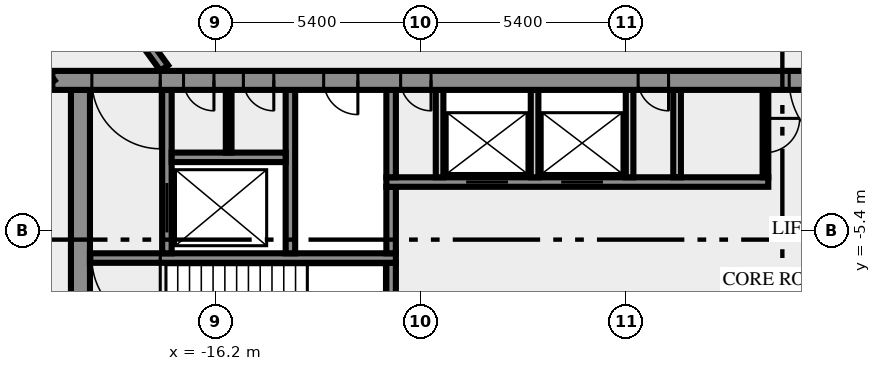
"""IFC4 building model, lengths in metres.
Left out: names, types, materials, properties, quantities, classifications, styles, units other than length and angle.
Written with IfcOpenShell. Run it as: python <this file> out.ifc"""

import sys

from ifc_helpers import new_model, si_unit, direction, frame, frame_2d, origin, place, context, subcontext, project, spatial, rectangle, extrude, element, fill, save


model = new_model("IFC4")
c1 = context("Model", 3, precision=1e-05, world=origin(), true_north=direction((0.0, 1.0)))
c2 = subcontext(c1, "Body", "Model", "MODEL_VIEW")
j1 = project(units=[si_unit("LENGTHUNIT", "METRE"), si_unit("PLANEANGLEUNIT", "RADIAN")], contexts=[c1])
p1 = place(None, origin())
s1 = spatial("IfcSite", under=j1, at=p1, CompositionType="ELEMENT")
p2 = place(p1, origin())
s2 = spatial("IfcBuilding", under=s1, at=p2, CompositionType="ELEMENT")
p3 = place(p2, frame((0.0, 0.0, 331.0)))
s3 = spatial("IfcBuildingStorey", under=s2, at=p3, CompositionType="ELEMENT", Elevation=331.0)
p4 = place(p3, frame((-19.75, -10.5, 0.0), z_axis=(0.0, 0.0, 1.0), x_axis=(0.0, 1.0, 0.0)))
e1 = element("IfcWall", 1, at=p4, inside=s3, PredefinedType="SHEAR", context=c2, shape_type="SweptSolid", body=[
    extrude(rectangle(XDim=8.8, YDim=0.5, at=frame_2d((4.4, 0.0))), origin(), (0.0, 0.0, 1.0), 3.65),
])
p5 = place(p3, frame((-11.575, -7.25, 0.0), z_axis=(0.0, 0.0, 1.0), x_axis=(0.0, 1.0, 0.0)))
e2 = element("IfcWall", 2, at=p5, inside=s3, PredefinedType="SHEAR", context=c2, shape_type="SweptSolid", body=[
    extrude(rectangle(XDim=1.0, YDim=0.25, at=frame_2d((0.5, 0.0))), origin(), (0.0, 0.0, 1.0), 3.65),
])
p6 = place(p3, frame((-11.45, -6.125, 0.0), z_axis=(0.0, 0.0, 1.0), x_axis=(-1.0, 0.0, 0.0)))
e3 = element("IfcWall", 3, at=p6, inside=s3, PredefinedType="SHEAR", context=c2, shape_type="SweptSolid", body=[
    extrude(rectangle(XDim=8.05, YDim=0.25, at=frame_2d((4.025, 0.0))), origin(), (0.0, 0.0, 1.0), 3.65),
])
p7 = place(p6, frame((6.2, 0.0, 0.0)))
e4 = element("IfcOpeningElement", 4, at=p7, cuts=e3, PredefinedType="OPENING", context=c2, shape_type="SweptSolid", body=[
    extrude(rectangle(XDim=1.8, YDim=2.1, at=frame_2d((0.9, 1.05))), frame((0.0, 0.135, 0.0), z_axis=(0.0, -1.0, 0.0), x_axis=(1.0, 0.0, 0.0)), (0.0, 0.0, 1.0), 0.27),
])
p8 = place(p3, frame((-17.475, -6.0, 0.0), z_axis=(0.0, 0.0, 1.0), x_axis=(0.0, 1.0, 0.0)))
e5 = element("IfcWall", 5, at=p8, inside=s3, PredefinedType="SHEAR", context=c2, shape_type="SweptSolid", body=[
    extrude(rectangle(XDim=4.3, YDim=0.25, at=frame_2d((2.15, 0.0))), origin(), (0.0, 0.0, 1.0), 3.65),
])
p9 = place(p8, frame((0.55, 0.0, 0.0)))
e6 = element("IfcOpeningElement", 6, at=p9, cuts=e5, PredefinedType="OPENING", context=c2, shape_type="SweptSolid", body=[
    extrude(rectangle(XDim=1.3, YDim=2.1, at=frame_2d((0.65, 1.05))), frame((0.0, 0.135, 0.0), z_axis=(0.0, -1.0, 0.0), x_axis=(1.0, 0.0, 0.0)), (0.0, 0.0, 1.0), 0.27),
])
p10 = place(p3, frame((-14.225, -6.0, 0.0), z_axis=(0.0, 0.0, 1.0), x_axis=(0.0, 1.0, 0.0)))
e7 = element("IfcWall", 7, at=p10, inside=s3, PredefinedType="SHEAR", context=c2, shape_type="SweptSolid", body=[
    extrude(rectangle(XDim=4.3, YDim=0.25, at=frame_2d((2.15, 0.0))), origin(), (0.0, 0.0, 1.0), 3.65),
])
p11 = place(p3, frame((-11.575, -6.0, 0.0), z_axis=(0.0, 0.0, 1.0), x_axis=(0.0, 1.0, 0.0)))
e8 = element("IfcWall", 8, at=p11, inside=s3, PredefinedType="SHEAR", context=c2, shape_type="SweptSolid", body=[
    extrude(rectangle(XDim=1.75, YDim=0.25, at=frame_2d((0.875, 0.0))), origin(), (0.0, 0.0, 1.0), 3.65),
])
p12 = place(p3, frame((-11.7, -4.125, 0.0), z_axis=(0.0, 0.0, 1.0), x_axis=(1.0, 0.0, 0.0)))
e9 = element("IfcWall", 9, at=p12, inside=s3, PredefinedType="SHEAR", context=c2, shape_type="SweptSolid", body=[
    extrude(rectangle(XDim=10.05, YDim=0.25, at=frame_2d((5.025, 0.0))), origin(), (0.0, 0.0, 1.0), 3.65),
])
p13 = place(p12, frame((2.1, 0.0, 0.0)))
e10 = element("IfcOpeningElement", 10, at=p13, cuts=e9, PredefinedType="OPENING", context=c2, shape_type="SweptSolid", body=[
    extrude(rectangle(XDim=1.1, YDim=2.1, at=frame_2d((0.55, 1.05))), frame((0.0, 0.135, 0.0), z_axis=(0.0, -1.0, 0.0), x_axis=(1.0, 0.0, 0.0)), (0.0, 0.0, 1.0), 0.27),
])
p14 = place(p12, frame((4.6, 0.0, 0.0)))
e11 = element("IfcOpeningElement", 11, at=p14, cuts=e9, PredefinedType="OPENING", context=c2, shape_type="SweptSolid", body=[
    extrude(rectangle(XDim=1.1, YDim=2.1, at=frame_2d((0.55, 1.05))), frame((0.0, 0.135, 0.0), z_axis=(0.0, -1.0, 0.0), x_axis=(1.0, 0.0, 0.0)), (0.0, 0.0, 1.0), 0.27),
])
p15 = place(p3, frame((-11.575, -4.0, 0.0), z_axis=(0.0, 0.0, 1.0), x_axis=(0.0, 1.0, 0.0)))
e12 = element("IfcWall", 12, at=p15, inside=s3, PredefinedType="SHEAR", context=c2, shape_type="SweptSolid", body=[
    extrude(rectangle(XDim=2.3, YDim=0.25, at=frame_2d((1.15, 0.0))), origin(), (0.0, 0.0, 1.0), 3.65),
])
for number, where, z_axis, x_axis in (
    (13, (-10.3, -4.0, 0.0), (0.0, 0.0, 1.0), (0.0, 1.0, 0.0)),
    (14, (-7.8, -4.0, 0.0), (0.0, 0.0, 1.0), (0.0, 1.0, 0.0)),
    (15, (-5.3, -4.0, 0.0), (0.0, 0.0, 1.0), (0.0, 1.0, 0.0)),
    (16, (-4.05, -4.0, 0.0), (0.0, 0.0, 1.0), (0.0, 1.0, 0.0)),
):
    element("IfcWall", number, at=place(p3, frame(where, z_axis=z_axis, x_axis=x_axis)), inside=s3, PredefinedType="SOLIDWALL", context=c2, shape_type="SweptSolid", body=[
        extrude(rectangle(XDim=2.3, YDim=0.2, at=frame_2d((1.15, 0.0))), origin(), (0.0, 0.0, 1.0), 3.65),
    ])
p16 = place(p3, frame((-1.725, -1.7, 0.0), z_axis=(0.0, 0.0, 1.0), x_axis=(0.0, -1.0, 0.0)))
e17 = element("IfcWall", 17, at=p16, inside=s3, PredefinedType="PARTITIONING", context=c2, shape_type="SweptSolid", body=[
    extrude(rectangle(XDim=2.3, YDim=0.15, at=frame_2d((1.15, 0.0))), origin(), (0.0, 0.0, 1.0), 3.65),
])
p17 = place(p16, frame((0.75, 0.0, 0.0)))
e18 = element("IfcOpeningElement", 18, at=p17, cuts=e17, PredefinedType="OPENING", context=c2, shape_type="SweptSolid", body=[
    extrude(rectangle(XDim=0.9, YDim=2.1, at=frame_2d((0.45, 1.05))), frame((0.0, 0.085, 0.0), z_axis=(0.0, -1.0, 0.0), x_axis=(1.0, 0.0, 0.0)), (0.0, 0.0, 1.0), 0.17),
])
p18 = place(p3, frame((-17.35, -3.475, 0.0), z_axis=(0.0, 0.0, 1.0), x_axis=(1.0, 0.0, 0.0)))
e19 = element("IfcWall", 19, at=p18, inside=s3, PredefinedType="SHEAR", context=c2, shape_type="SweptSolid", body=[
    extrude(rectangle(XDim=3.0, YDim=0.25, at=frame_2d((1.5, 0.0))), origin(), (0.0, 0.0, 1.0), 3.65),
])
p19 = place(p3, frame((-15.85, -3.35, 0.0), z_axis=(0.0, 0.0, 1.0), x_axis=(0.0, 1.0, 0.0)))
e20 = element("IfcWall", 20, at=p19, inside=s3, PredefinedType="PARTITIONING", context=c2, shape_type="SweptSolid", body=[
    extrude(rectangle(XDim=1.65, YDim=0.15, at=frame_2d((0.825, 0.0))), origin(), (0.0, 0.0, 1.0), 3.65),
])
p20 = place(p3, frame((20.49, -1.45, 0.0), z_axis=(0.0, 0.0, 1.0), x_axis=(-1.0, 0.0, 0.0)))
e21 = element("IfcWall", 21, at=p20, inside=s3, PredefinedType="SHEAR", context=c2, shape_type="SweptSolid", body=[
    extrude(rectangle(XDim=40.98, YDim=0.5, at=frame_2d((20.49, 0.0))), origin(), (0.0, 0.0, 1.0), 3.65),
])
p21 = place(p20, frame((38.14, 0.0, 0.0)))
e22 = element("IfcOpeningElement", 22, at=p21, cuts=e21, PredefinedType="OPENING", context=c2, shape_type="SweptSolid", body=[
    extrude(rectangle(XDim=1.8, YDim=2.1, at=frame_2d((0.9, 1.05))), frame((0.0, 0.26, 0.0), z_axis=(0.0, -1.0, 0.0), x_axis=(1.0, 0.0, 0.0)), (0.0, 0.0, 1.0), 0.52),
])
p22 = place(p20, frame((36.728, 0.0, 0.0)))
e23 = element("IfcOpeningElement", 23, at=p22, cuts=e21, PredefinedType="OPENING", context=c2, shape_type="SweptSolid", body=[
    extrude(rectangle(XDim=0.8, YDim=2.1, at=frame_2d((0.4, 1.05))), frame((0.0, 0.26, 0.0), z_axis=(0.0, -1.0, 0.0), x_axis=(1.0, 0.0, 0.0)), (0.0, 0.0, 1.0), 0.52),
])
p23 = place(p20, frame((35.153, 0.0, 0.0)))
e24 = element("IfcOpeningElement", 24, at=p23, cuts=e21, PredefinedType="OPENING", context=c2, shape_type="SweptSolid", body=[
    extrude(rectangle(XDim=0.8, YDim=2.1, at=frame_2d((0.4, 1.05))), frame((0.0, 0.26, 0.0), z_axis=(0.0, -1.0, 0.0), x_axis=(1.0, 0.0, 0.0)), (0.0, 0.0, 1.0), 0.52),
])
p24 = place(p20, frame((32.94, 0.0, 0.0)))
e25 = element("IfcOpeningElement", 25, at=p24, cuts=e21, PredefinedType="OPENING", context=c2, shape_type="SweptSolid", body=[
    extrude(rectangle(XDim=0.9, YDim=2.1, at=frame_2d((0.45, 1.05))), frame((0.0, 0.26, 0.0), z_axis=(0.0, -1.0, 0.0), x_axis=(1.0, 0.0, 0.0)), (0.0, 0.0, 1.0), 0.52),
])
p25 = place(p20, frame((31.015, 0.0, 0.0)))
e26 = element("IfcOpeningElement", 26, at=p25, cuts=e21, PredefinedType="OPENING", context=c2, shape_type="SweptSolid", body=[
    extrude(rectangle(XDim=0.8, YDim=2.1, at=frame_2d((0.4, 1.05))), frame((0.0, 0.26, 0.0), z_axis=(0.0, -1.0, 0.0), x_axis=(1.0, 0.0, 0.0)), (0.0, 0.0, 1.0), 0.52),
])
p26 = place(p20, frame((24.765, 0.0, 0.0)))
e27 = element("IfcOpeningElement", 27, at=p26, cuts=e21, PredefinedType="OPENING", context=c2, shape_type="SweptSolid", body=[
    extrude(rectangle(XDim=0.8, YDim=2.1, at=frame_2d((0.4, 1.05))), frame((0.0, 0.26, 0.0), z_axis=(0.0, -1.0, 0.0), x_axis=(1.0, 0.0, 0.0)), (0.0, 0.0, 1.0), 0.52),
])
p27 = place(p20, frame((19.59, 0.0, 0.0)))
e28 = element("IfcOpeningElement", 28, at=p27, cuts=e21, PredefinedType="OPENING", context=c2, shape_type="SweptSolid", body=[
    extrude(rectangle(XDim=2.0, YDim=2.1, at=frame_2d((1.0, 1.05))), frame((0.0, 0.26, 0.0), z_axis=(0.0, -1.0, 0.0), x_axis=(1.0, 0.0, 0.0)), (0.0, 0.0, 1.0), 0.52),
])
p28 = place(p20, frame((15.103, 0.0, 0.0)))
e29 = element("IfcOpeningElement", 29, at=p28, cuts=e21, PredefinedType="OPENING", context=c2, shape_type="SweptSolid", body=[
    extrude(rectangle(XDim=0.9, YDim=2.1, at=frame_2d((0.45, 1.05))), frame((0.0, 0.26, 0.0), z_axis=(0.0, -1.0, 0.0), x_axis=(1.0, 0.0, 0.0)), (0.0, 0.0, 1.0), 0.52),
])
p29 = place(p20, frame((13.04, 0.0, 0.0)))
e30 = element("IfcOpeningElement", 30, at=p29, cuts=e21, PredefinedType="OPENING", context=c2, shape_type="SweptSolid", body=[
    extrude(rectangle(XDim=0.9, YDim=2.1, at=frame_2d((0.45, 1.05))), frame((0.0, 0.26, 0.0), z_axis=(0.0, -1.0, 0.0), x_axis=(1.0, 0.0, 0.0)), (0.0, 0.0, 1.0), 0.52),
])
p30 = place(p20, frame((10.177, 0.0, 0.0)))
e31 = element("IfcOpeningElement", 31, at=p30, cuts=e21, PredefinedType="OPENING", context=c2, shape_type="SweptSolid", body=[
    extrude(rectangle(XDim=0.9, YDim=2.1, at=frame_2d((0.45, 1.05))), frame((0.0, 0.26, 0.0), z_axis=(0.0, -1.0, 0.0), x_axis=(1.0, 0.0, 0.0)), (0.0, 0.0, 1.0), 0.52),
])
p31 = place(p20, frame((7.14, 0.0, 0.0)))
e32 = element("IfcOpeningElement", 32, at=p31, cuts=e21, PredefinedType="OPENING", context=c2, shape_type="SweptSolid", body=[
    extrude(rectangle(XDim=0.9, YDim=2.1, at=frame_2d((0.45, 1.05))), frame((0.0, 0.26, 0.0), z_axis=(0.0, -1.0, 0.0), x_axis=(1.0, 0.0, 0.0)), (0.0, 0.0, 1.0), 0.52),
])
p32 = place(p20, frame((4.19, 0.0, 0.0)))
e33 = element("IfcOpeningElement", 33, at=p32, cuts=e21, PredefinedType="OPENING", context=c2, shape_type="SweptSolid", body=[
    extrude(rectangle(XDim=0.9, YDim=2.1, at=frame_2d((0.45, 1.05))), frame((0.0, 0.26, 0.0), z_axis=(0.0, -1.0, 0.0), x_axis=(1.0, 0.0, 0.0)), (0.0, 0.0, 1.0), 0.52),
])
p33 = place(p20, frame((1.04, 0.0, 0.0)))
e34 = element("IfcOpeningElement", 34, at=p33, cuts=e21, PredefinedType="OPENING", context=c2, shape_type="SweptSolid", body=[
    extrude(rectangle(XDim=1.8, YDim=2.1, at=frame_2d((0.9, 1.05))), frame((0.0, 0.26, 0.0), z_axis=(0.0, -1.0, 0.0), x_axis=(1.0, 0.0, 0.0)), (0.0, 0.0, 1.0), 0.52),
])
p34 = place(p3, frame((-20.531, -1.523, 0.0), z_axis=(0.0, 0.0, 1.0), x_axis=(-0.587785867777, 0.809016547199, 0.0)))
e35 = element("IfcWall", 35, at=p34, inside=s3, PredefinedType="SOLIDWALL", context=c2, shape_type="SweptSolid", body=[
    extrude(rectangle(XDim=16.67, YDim=0.25, at=frame_2d((8.335, 0.0))), origin(), (0.0, 0.0, 1.0), 3.65),
])
p35 = place(p34, frame((0.533, 0.0, 0.0)))
e36 = element("IfcOpeningElement", 36, at=p35, cuts=e35, PredefinedType="OPENING", context=c2, shape_type="SweptSolid", body=[
    extrude(rectangle(XDim=0.9, YDim=2.1, at=frame_2d((0.45, 1.05))), frame((0.0, 0.135, 0.0), z_axis=(0.0, -1.0, 0.0), x_axis=(1.0, 0.0, 0.0)), (0.0, 0.0, 1.0), 0.27),
])
p36 = place(p34, frame((15.296, 0.0, 0.0)))
e37 = element("IfcOpeningElement", 37, at=p36, cuts=e35, PredefinedType="OPENING", context=c2, shape_type="SweptSolid", body=[
    extrude(rectangle(XDim=0.9, YDim=2.1, at=frame_2d((0.45, 1.05))), frame((0.0, 0.135, 0.0), z_axis=(0.0, -1.0, 0.0), x_axis=(1.0, 0.0, 0.0)), (0.0, 0.0, 1.0), 0.27),
])
p37 = place(p3, frame((-28.039, 13.319, 0.0), z_axis=(0.0, 0.0, 1.0), x_axis=(0.587791911753, -0.809012155952, 0.0)))
e38 = element("IfcWall", 38, at=p37, inside=s3, PredefinedType="SOLIDWALL", context=c2, shape_type="SweptSolid", body=[
    extrude(rectangle(XDim=17.853, YDim=0.25, at=frame_2d((8.927, 0.0))), origin(), (0.0, 0.0, 1.0), 3.65),
])
p38 = place(p37, frame((0.225, 0.0, 0.0)))
e39 = element("IfcOpeningElement", 39, at=p38, cuts=e38, PredefinedType="OPENING", context=c2, shape_type="SweptSolid", body=[
    extrude(rectangle(XDim=0.9, YDim=2.1, at=frame_2d((0.45, 1.05))), frame((0.0, 0.135, 0.0), z_axis=(0.0, -1.0, 0.0), x_axis=(1.0, 0.0, 0.0)), (0.0, 0.0, 1.0), 0.27),
])
p39 = place(p7, origin())
e40 = element("IfcDoor", 40, at=p39, inside=s3, OperationType="DOUBLE_DOOR_SINGLE_SWING", PredefinedType="DOOR", context=c2, shape_type="SweptSolid", body=[
    extrude(rectangle(XDim=1.8, YDim=2.1, at=frame_2d((0.9, 1.05))), frame((0.0, 0.025, 0.0), z_axis=(0.0, -1.0, 0.0), x_axis=(1.0, 0.0, 0.0)), (0.0, 0.0, 1.0), 0.05),
])
fill(e4, e40)
p40 = place(p9, origin())
e41 = element("IfcDoor", 41, at=p40, inside=s3, OperationType="DOUBLE_DOOR_SLIDING", PredefinedType="DOOR", context=c2, shape_type="SweptSolid", body=[
    extrude(rectangle(XDim=1.3, YDim=2.1, at=frame_2d((0.65, 1.05))), frame((0.0, 0.025, 0.0), z_axis=(0.0, -1.0, 0.0), x_axis=(1.0, 0.0, 0.0)), (0.0, 0.0, 1.0), 0.05),
])
fill(e6, e41)
p41 = place(p13, origin())
e42 = element("IfcDoor", 42, at=p41, inside=s3, OperationType="DOUBLE_DOOR_SLIDING", PredefinedType="DOOR", context=c2, shape_type="SweptSolid", body=[
    extrude(rectangle(XDim=1.1, YDim=2.1, at=frame_2d((0.55, 1.05))), frame((0.0, 0.025, 0.0), z_axis=(0.0, -1.0, 0.0), x_axis=(1.0, 0.0, 0.0)), (0.0, 0.0, 1.0), 0.05),
])
fill(e10, e42)
p42 = place(p14, origin())
e43 = element("IfcDoor", 43, at=p42, inside=s3, OperationType="DOUBLE_DOOR_SLIDING", PredefinedType="DOOR", context=c2, shape_type="SweptSolid", body=[
    extrude(rectangle(XDim=1.1, YDim=2.1, at=frame_2d((0.55, 1.05))), frame((0.0, 0.025, 0.0), z_axis=(0.0, -1.0, 0.0), x_axis=(1.0, 0.0, 0.0)), (0.0, 0.0, 1.0), 0.05),
])
fill(e11, e43)
p43 = place(p17, origin())
e44 = element("IfcDoor", 44, at=p43, inside=s3, OperationType="SINGLE_SWING_RIGHT", PredefinedType="DOOR", context=c2, shape_type="SweptSolid", body=[
    extrude(rectangle(XDim=0.9, YDim=2.1, at=frame_2d((0.45, 1.05))), frame((0.0, 0.025, 0.0), z_axis=(0.0, -1.0, 0.0), x_axis=(1.0, 0.0, 0.0)), (0.0, 0.0, 1.0), 0.05),
])
fill(e18, e44)
p44 = place(p21, origin())
e45 = element("IfcDoor", 45, at=p44, inside=s3, OperationType="DOUBLE_DOOR_SINGLE_SWING", PredefinedType="DOOR", context=c2, shape_type="SweptSolid", body=[
    extrude(rectangle(XDim=1.8, YDim=2.1, at=frame_2d((0.9, 1.05))), frame((0.0, 0.025, 0.0), z_axis=(0.0, -1.0, 0.0), x_axis=(1.0, 0.0, 0.0)), (0.0, 0.0, 1.0), 0.05),
])
fill(e22, e45)
p45 = place(p22, origin())
e46 = element("IfcDoor", 46, at=p45, inside=s3, OperationType="SINGLE_SWING_RIGHT", PredefinedType="DOOR", context=c2, shape_type="SweptSolid", body=[
    extrude(rectangle(XDim=0.8, YDim=2.1, at=frame_2d((0.4, 1.05))), frame((0.0, 0.025, 0.0), z_axis=(0.0, -1.0, 0.0), x_axis=(1.0, 0.0, 0.0)), (0.0, 0.0, 1.0), 0.05),
])
fill(e23, e46)
p46 = place(p23, origin())
e47 = element("IfcDoor", 47, at=p46, inside=s3, OperationType="SINGLE_SWING_RIGHT", PredefinedType="DOOR", context=c2, shape_type="SweptSolid", body=[
    extrude(rectangle(XDim=0.8, YDim=2.1, at=frame_2d((0.4, 1.05))), frame((0.0, 0.025, 0.0), z_axis=(0.0, -1.0, 0.0), x_axis=(1.0, 0.0, 0.0)), (0.0, 0.0, 1.0), 0.05),
])
fill(e24, e47)
p47 = place(p24, origin())
e48 = element("IfcDoor", 48, at=p47, inside=s3, OperationType="SINGLE_SWING_RIGHT", PredefinedType="DOOR", context=c2, shape_type="SweptSolid", body=[
    extrude(rectangle(XDim=0.9, YDim=2.1, at=frame_2d((0.45, 1.05))), frame((0.0, 0.025, 0.0), z_axis=(0.0, -1.0, 0.0), x_axis=(1.0, 0.0, 0.0)), (0.0, 0.0, 1.0), 0.05),
])
fill(e25, e48)
p48 = place(p25, origin())
e49 = element("IfcDoor", 49, at=p48, inside=s3, OperationType="SINGLE_SWING_RIGHT", PredefinedType="DOOR", context=c2, shape_type="SweptSolid", body=[
    extrude(rectangle(XDim=0.8, YDim=2.1, at=frame_2d((0.4, 1.05))), frame((0.0, 0.025, 0.0), z_axis=(0.0, -1.0, 0.0), x_axis=(1.0, 0.0, 0.0)), (0.0, 0.0, 1.0), 0.05),
])
fill(e26, e49)
p49 = place(p26, origin())
e50 = element("IfcDoor", 50, at=p49, inside=s3, OperationType="SINGLE_SWING_RIGHT", PredefinedType="DOOR", context=c2, shape_type="SweptSolid", body=[
    extrude(rectangle(XDim=0.8, YDim=2.1, at=frame_2d((0.4, 1.05))), frame((0.0, 0.025, 0.0), z_axis=(0.0, -1.0, 0.0), x_axis=(1.0, 0.0, 0.0)), (0.0, 0.0, 1.0), 0.05),
])
fill(e27, e50)
p50 = place(p27, origin())
e51 = element("IfcDoor", 51, at=p50, inside=s3, OperationType="DOUBLE_DOOR_SINGLE_SWING", PredefinedType="DOOR", context=c2, shape_type="SweptSolid", body=[
    extrude(rectangle(XDim=2.0, YDim=2.1, at=frame_2d((1.0, 1.05))), frame((0.0, 0.025, 0.0), z_axis=(0.0, -1.0, 0.0), x_axis=(1.0, 0.0, 0.0)), (0.0, 0.0, 1.0), 0.05),
])
fill(e28, e51)
save(model, sys.argv[1])
